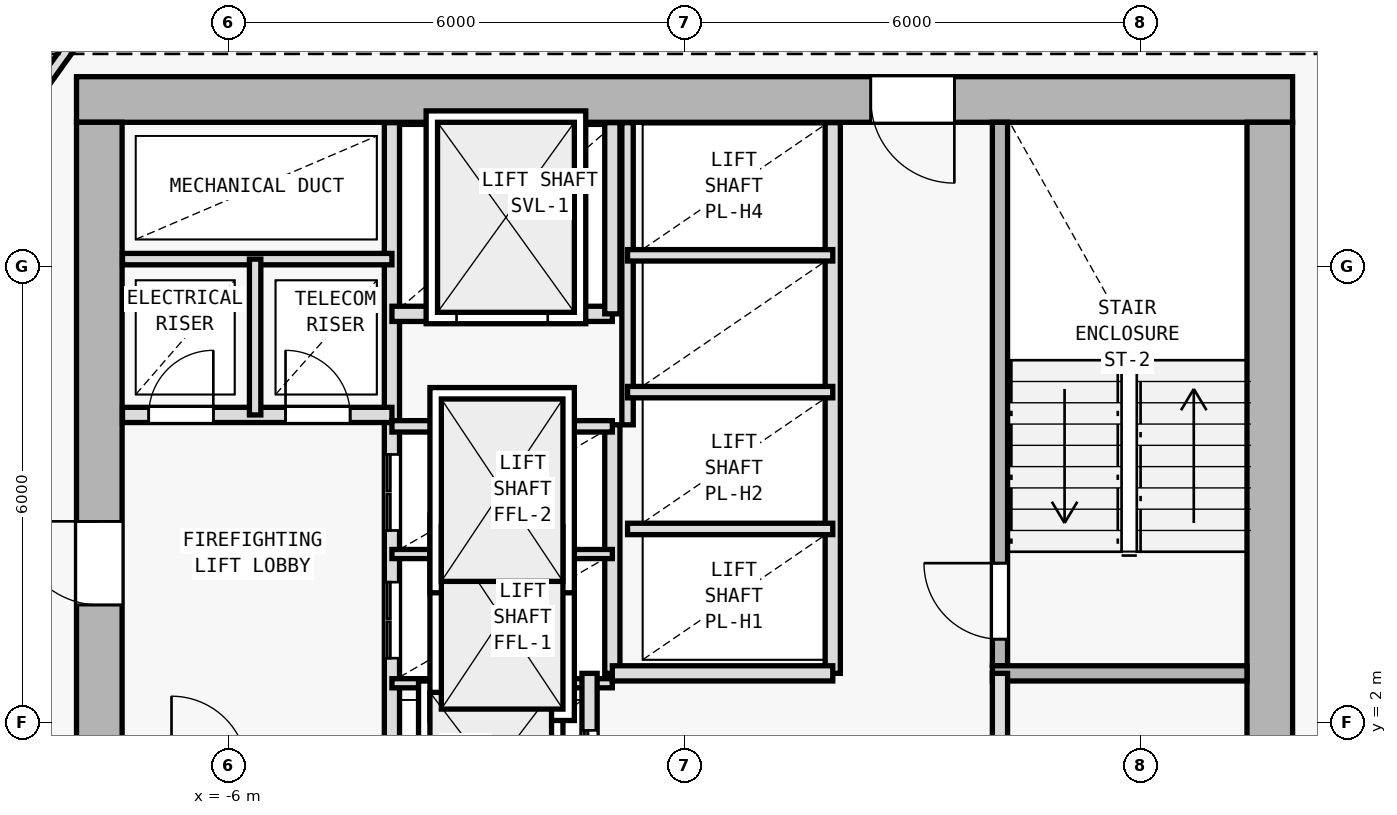
"""IFC4 building model, lengths in metres.
Left out: names, types, materials, properties, quantities, classifications, styles, units other than length and angle.
Written with IfcOpenShell. Run it as: python <this file> out.ifc"""

import sys

from ifc_helpers import new_model, si_unit, direction, frame, frame_2d, origin, origin_2d, place, context, subcontext, project, spatial, rectangle, i_section, extrude, element, fill, save


model = new_model("IFC4")
c1 = context("Model", 3, precision=1e-05, world=origin(), true_north=direction((0.0, 1.0)))
c2 = subcontext(c1, "Body", "Model", "MODEL_VIEW")
j1 = project(units=[si_unit("LENGTHUNIT", "METRE"), si_unit("PLANEANGLEUNIT", "RADIAN")], contexts=[c1])
p1 = place(None, origin())
s1 = spatial("IfcSite", under=j1, at=p1, CompositionType="ELEMENT")
p2 = place(p1, origin())
s2 = spatial("IfcBuilding", under=s1, at=p2, CompositionType="ELEMENT")
p3 = place(p2, frame((0.0, 0.0, 114.9)))
s3 = spatial("IfcBuildingStorey", under=s2, at=p3, CompositionType="ELEMENT", Elevation=114.9)
for number, where, z_axis, x_axis in (
    (1, (7.7, 10.2, 0.0), (0.0, 0.0, 1.0), (1.0, 0.0, 0.0)),
    (2, (-7.7, 10.2, 0.0), (0.0, 0.0, 1.0), (1.0, 0.0, 0.0)),
    (3, (-7.7, 2.0, 0.0), (0.0, 0.0, 1.0), (1.0, 0.0, 0.0)),
):
    element("IfcColumn", number, at=place(p3, frame(where, z_axis=z_axis, x_axis=x_axis)), inside=s3, PredefinedType="COLUMN", context=c2, shape_type="SweptSolid", body=[
        extrude(i_section(OverallWidth=0.409, OverallDepth=0.425, WebThickness=0.021, FlangeThickness=0.034, FilletRadius=0.015, at=origin_2d()), origin(), (0.0, 0.0, 1.0), 3.6),
    ])
p4 = place(p3, frame((8.0, 10.2, 0.0), z_axis=(0.0, 0.0, 1.0), x_axis=(-1.0, 0.0, 0.0)))
e4 = element("IfcWall", 4, at=p4, inside=s3, PredefinedType="SHEAR", context=c2, shape_type="SweptSolid", body=[
    extrude(rectangle(XDim=16.0, YDim=0.6, at=frame_2d((8.0, 0.0))), origin(), (0.0, 0.0, 1.0), 3.35),
])
p5 = place(p4, frame((4.45, 0.0, 0.0)))
e5 = element("IfcOpeningElement", 5, at=p5, cuts=e4, PredefinedType="OPENING", context=c2, shape_type="SweptSolid", body=[
    extrude(rectangle(XDim=1.1, YDim=2.15, at=frame_2d((0.55, 1.075))), frame((0.0, 0.31, 0.0), z_axis=(0.0, -1.0, 0.0), x_axis=(1.0, 0.0, 0.0)), (0.0, 0.0, 1.0), 0.62),
])
p6 = place(p3, frame((-7.7, -9.1, 0.0), z_axis=(0.0, 0.0, 1.0), x_axis=(0.0, 1.0, 0.0)))
e6 = element("IfcWall", 6, at=p6, inside=s3, PredefinedType="SHEAR", context=c2, shape_type="SweptSolid", body=[
    extrude(rectangle(XDim=19.0, YDim=0.6, at=frame_2d((9.5, 0.0))), origin(), (0.0, 0.0, 1.0), 3.35),
])
p7 = place(p6, frame((12.65, 0.0, 0.0)))
e7 = element("IfcOpeningElement", 7, at=p7, cuts=e6, PredefinedType="OPENING", context=c2, shape_type="SweptSolid", body=[
    extrude(rectangle(XDim=1.1, YDim=2.15, at=frame_2d((0.55, 1.075))), frame((0.0, 0.31, 0.0), z_axis=(0.0, -1.0, 0.0), x_axis=(1.0, 0.0, 0.0)), (0.0, 0.0, 1.0), 0.62),
])
p8 = place(p3, frame((7.7, 9.9, 0.0), z_axis=(0.0, 0.0, 1.0), x_axis=(0.0, -1.0, 0.0)))
e8 = element("IfcWall", 8, at=p8, inside=s3, PredefinedType="SHEAR", context=c2, shape_type="SweptSolid", body=[
    extrude(rectangle(XDim=19.0, YDim=0.6, at=frame_2d((9.5, 0.0))), origin(), (0.0, 0.0, 1.0), 3.35),
])
p9 = place(p3, frame((-3.85, 1.35, 0.0), z_axis=(0.0, 0.0, 1.0), x_axis=(0.0, 1.0, 0.0)))
e9 = element("IfcWall", 9, at=p9, inside=s3, PredefinedType="SOLIDWALL", context=c2, shape_type="SweptSolid", body=[
    extrude(rectangle(XDim=8.545, YDim=0.2, at=frame_2d((4.272, 0.0))), origin(), (0.0, 0.0, 1.0), 3.35),
])
p10 = place(p9, frame((1.5, 0.0, 0.0)))
e10 = element("IfcOpeningElement", 10, at=p10, cuts=e9, PredefinedType="OPENING", context=c2, shape_type="SweptSolid", body=[
    extrude(rectangle(XDim=1.0, YDim=2.15, at=frame_2d((0.5, 1.075))), frame((0.0, 0.11, 0.0), z_axis=(0.0, -1.0, 0.0), x_axis=(1.0, 0.0, 0.0)), (0.0, 0.0, 1.0), 0.22),
])
p11 = place(p9, frame((3.18, 0.0, 0.0)))
e11 = element("IfcOpeningElement", 11, at=p11, cuts=e9, PredefinedType="OPENING", context=c2, shape_type="SweptSolid", body=[
    extrude(rectangle(XDim=1.0, YDim=2.15, at=frame_2d((0.5, 1.075))), frame((0.0, 0.11, 0.0), z_axis=(0.0, -1.0, 0.0), x_axis=(1.0, 0.0, 0.0)), (0.0, 0.0, 1.0), 0.22),
])
p12 = place(p3, frame((-7.395, 6.05, 0.0), z_axis=(0.0, 0.0, 1.0), x_axis=(1.0, 0.0, 0.0)))
e12 = element("IfcWall", 12, at=p12, inside=s3, PredefinedType="SOLIDWALL", context=c2, shape_type="SweptSolid", body=[
    extrude(rectangle(XDim=3.545, YDim=0.2, at=frame_2d((1.772, 0.0))), origin(), (0.0, 0.0, 1.0), 3.35),
])
p13 = place(p12, frame((0.345, 0.0, 0.0)))
e13 = element("IfcOpeningElement", 13, at=p13, cuts=e12, PredefinedType="OPENING", context=c2, shape_type="SweptSolid", body=[
    extrude(rectangle(XDim=0.85, YDim=2.1, at=frame_2d((0.425, 1.05))), frame((0.0, 0.11, 0.0), z_axis=(0.0, -1.0, 0.0), x_axis=(1.0, 0.0, 0.0)), (0.0, 0.0, 1.0), 0.22),
])
p14 = place(p12, frame((2.145, 0.0, 0.0)))
e14 = element("IfcOpeningElement", 14, at=p14, cuts=e12, PredefinedType="OPENING", context=c2, shape_type="SweptSolid", body=[
    extrude(rectangle(XDim=0.85, YDim=2.1, at=frame_2d((0.425, 1.05))), frame((0.0, 0.11, 0.0), z_axis=(0.0, -1.0, 0.0), x_axis=(1.0, 0.0, 0.0)), (0.0, 0.0, 1.0), 0.22),
])
p15 = place(p3, frame((-7.395, 8.1, 0.0), z_axis=(0.0, 0.0, 1.0), x_axis=(1.0, 0.0, 0.0)))
e15 = element("IfcWall", 15, at=p15, inside=s3, PredefinedType="PARTITIONING", context=c2, shape_type="SweptSolid", body=[
    extrude(rectangle(XDim=3.545, YDim=0.15, at=frame_2d((1.772, 0.0))), origin(), (0.0, 0.0, 1.0), 3.35),
])
p16 = place(p3, frame((-5.65, 6.05, 0.0), z_axis=(0.0, 0.0, 1.0), x_axis=(0.0, 1.0, 0.0)))
e16 = element("IfcWall", 16, at=p16, inside=s3, PredefinedType="PARTITIONING", context=c2, shape_type="SweptSolid", body=[
    extrude(rectangle(XDim=2.05, YDim=0.15, at=frame_2d((1.025, 0.0))), origin(), (0.0, 0.0, 1.0), 3.35),
])
p17 = place(p3, frame((4.15, 2.75, 0.0), z_axis=(0.0, 0.0, 1.0), x_axis=(0.0, 1.0, 0.0)))
e17 = element("IfcWall", 17, at=p17, inside=s3, PredefinedType="SOLIDWALL", context=c2, shape_type="SweptSolid", body=[
    extrude(rectangle(XDim=7.15, YDim=0.2, at=frame_2d((3.575, 0.0))), origin(), (0.0, 0.0, 1.0), 3.35),
])
p18 = place(p17, frame((0.35, 0.0, 0.0)))
e18 = element("IfcOpeningElement", 18, at=p18, cuts=e17, PredefinedType="OPENING", context=c2, shape_type="SweptSolid", body=[
    extrude(rectangle(XDim=1.0, YDim=2.15, at=frame_2d((0.5, 1.075))), frame((0.0, 0.11, 0.0), z_axis=(0.0, -1.0, 0.0), x_axis=(1.0, 0.0, 0.0)), (0.0, 0.0, 1.0), 0.22),
])
p19 = place(p3, frame((4.05, 2.65, 0.0), z_axis=(0.0, 0.0, 1.0), x_axis=(1.0, 0.0, 0.0)))
e19 = element("IfcWall", 19, at=p19, inside=s3, PredefinedType="SOLIDWALL", context=c2, shape_type="SweptSolid", body=[
    extrude(rectangle(XDim=3.35, YDim=0.2, at=frame_2d((1.675, 0.0))), origin(), (0.0, 0.0, 1.0), 3.35),
])
p20 = place(p3, frame((-0.95, 2.65, 0.0), z_axis=(0.0, 0.0, 1.0), x_axis=(0.0, 1.0, 0.0)))
e20 = element("IfcWall", 20, at=p20, inside=s3, PredefinedType="SOLIDWALL", context=c2, shape_type="SweptSolid", body=[
    extrude(rectangle(XDim=3.27, YDim=0.2, at=frame_2d((1.635, 0.0))), origin(), (0.0, 0.0, 1.0), 3.35),
])
for number, where, z_axis, x_axis in (
    (21, (-3.85, 2.52, 0.0), (0.0, 0.0, 1.0), (1.0, 0.0, 0.0)),
    (22, (-3.85, 4.22, 0.0), (0.0, 0.0, 1.0), (1.0, 0.0, 0.0)),
):
    element("IfcWall", number, at=place(p3, frame(where, z_axis=z_axis, x_axis=x_axis)), inside=s3, PredefinedType="PARTITIONING", context=c2, shape_type="SweptSolid", body=[
        extrude(rectangle(XDim=2.9, YDim=0.12, at=frame_2d((1.45, 0.0))), origin(), (0.0, 0.0, 1.0), 3.35),
    ])
p21 = place(p3, frame((-3.85, 5.9, 0.0), z_axis=(0.0, 0.0, 1.0), x_axis=(1.0, 0.0, 0.0)))
e23 = element("IfcWall", 23, at=p21, inside=s3, PredefinedType="PARTITIONING", context=c2, shape_type="SweptSolid", body=[
    extrude(rectangle(XDim=2.9, YDim=0.15, at=frame_2d((1.45, 0.0))), origin(), (0.0, 0.0, 1.0), 3.35),
])
p22 = place(p3, frame((-3.85, 7.38, 0.0), z_axis=(0.0, 0.0, 1.0), x_axis=(1.0, 0.0, 0.0)))
e24 = element("IfcWall", 24, at=p22, inside=s3, PredefinedType="SOLIDWALL", context=c2, shape_type="SweptSolid", body=[
    extrude(rectangle(XDim=2.9, YDim=0.2, at=frame_2d((1.45, 0.0))), origin(), (0.0, 0.0, 1.0), 3.35),
])
p23 = place(p22, frame((0.85, 0.0, 0.0)))
e25 = element("IfcOpeningElement", 25, at=p23, cuts=e24, PredefinedType="OPENING", context=c2, shape_type="SweptSolid", body=[
    extrude(rectangle(XDim=1.2, YDim=2.2, at=frame_2d((0.6, 1.1))), frame((0.0, 0.11, 0.0), z_axis=(0.0, -1.0, 0.0), x_axis=(1.0, 0.0, 0.0)), (0.0, 0.0, 1.0), 0.22),
])
p24 = place(p3, frame((-0.95, 7.38, 0.0), z_axis=(0.0, 0.0, 1.0), x_axis=(0.0, 1.0, 0.0)))
e26 = element("IfcWall", 26, at=p24, inside=s3, PredefinedType="SOLIDWALL", context=c2, shape_type="SweptSolid", body=[
    extrude(rectangle(XDim=2.515, YDim=0.2, at=frame_2d((1.258, 0.0))), origin(), (0.0, 0.0, 1.0), 3.35),
])
p25 = place(p3, frame((4.15, -6.05, 0.0), z_axis=(0.0, 0.0, 1.0), x_axis=(0.0, 1.0, 0.0)))
e27 = element("IfcWall", 27, at=p25, inside=s3, PredefinedType="SOLIDWALL", context=c2, shape_type="SweptSolid", body=[
    extrude(rectangle(XDim=8.7, YDim=0.2, at=frame_2d((4.35, 0.0))), origin(), (0.0, 0.0, 1.0), 3.35),
])
p26 = place(p25, frame((3.6, 0.0, 0.0)))
e28 = element("IfcOpeningElement", 28, at=p26, cuts=e27, PredefinedType="OPENING", context=c2, shape_type="SweptSolid", body=[
    extrude(rectangle(XDim=0.95, YDim=2.1, at=frame_2d((0.475, 1.05))), frame((0.0, 0.11, 0.0), z_axis=(0.0, -1.0, 0.0), x_axis=(1.0, 0.0, 0.0)), (0.0, 0.0, 1.0), 0.22),
])
p27 = place(p3, frame((-1.25, -6.05, 0.0), z_axis=(0.0, 0.0, 1.0), x_axis=(0.0, 1.0, 0.0)))
e29 = element("IfcWall", 29, at=p27, inside=s3, PredefinedType="SOLIDWALL", context=c2, shape_type="SweptSolid", body=[
    extrude(rectangle(XDim=8.7, YDim=0.2, at=frame_2d((4.35, 0.0))), origin(), (0.0, 0.0, 1.0), 3.35),
])
p28 = place(p27, frame((0.55, 0.0, 0.0)))
e30 = element("IfcOpeningElement", 30, at=p28, cuts=e29, PredefinedType="OPENING", context=c2, shape_type="SweptSolid", body=[
    extrude(rectangle(XDim=1.1, YDim=2.15, at=frame_2d((0.55, 1.075))), frame((0.0, 0.11, 0.0), z_axis=(0.0, -1.0, 0.0), x_axis=(1.0, 0.0, 0.0)), (0.0, 0.0, 1.0), 0.22),
])
p29 = place(p27, frame((2.65, 0.0, 0.0)))
e31 = element("IfcOpeningElement", 31, at=p29, cuts=e29, PredefinedType="OPENING", context=c2, shape_type="SweptSolid", body=[
    extrude(rectangle(XDim=1.1, YDim=2.15, at=frame_2d((0.55, 1.075))), frame((0.0, 0.11, 0.0), z_axis=(0.0, -1.0, 0.0), x_axis=(1.0, 0.0, 0.0)), (0.0, 0.0, 1.0), 0.22),
])
p30 = place(p27, frame((4.75, 0.0, 0.0)))
e32 = element("IfcOpeningElement", 32, at=p30, cuts=e29, PredefinedType="OPENING", context=c2, shape_type="SweptSolid", body=[
    extrude(rectangle(XDim=1.1, YDim=2.15, at=frame_2d((0.55, 1.075))), frame((0.0, 0.11, 0.0), z_axis=(0.0, -1.0, 0.0), x_axis=(1.0, 0.0, 0.0)), (0.0, 0.0, 1.0), 0.22),
])
p31 = place(p27, frame((6.85, 0.0, 0.0)))
e33 = element("IfcOpeningElement", 33, at=p31, cuts=e29, PredefinedType="OPENING", context=c2, shape_type="SweptSolid", body=[
    extrude(rectangle(XDim=1.1, YDim=2.15, at=frame_2d((0.55, 1.075))), frame((0.0, 0.11, 0.0), z_axis=(0.0, -1.0, 0.0), x_axis=(1.0, 0.0, 0.0)), (0.0, 0.0, 1.0), 0.22),
])
p32 = place(p3, frame((1.95, 2.65, 0.0), z_axis=(0.0, 0.0, 1.0), x_axis=(0.0, 1.0, 0.0)))
e34 = element("IfcWall", 34, at=p32, inside=s3, PredefinedType="SOLIDWALL", context=c2, shape_type="SweptSolid", body=[
    extrude(rectangle(XDim=7.245, YDim=0.2, at=frame_2d((3.623, 0.0))), origin(), (0.0, 0.0, 1.0), 3.35),
])
p33 = place(p3, frame((-0.95, 2.65, 0.0), z_axis=(0.0, 0.0, 1.0), x_axis=(1.0, 0.0, 0.0)))
e35 = element("IfcWall", 35, at=p33, inside=s3, PredefinedType="SOLIDWALL", context=c2, shape_type="SweptSolid", body=[
    extrude(rectangle(XDim=2.9, YDim=0.2, at=frame_2d((1.45, 0.0))), origin(), (0.0, 0.0, 1.0), 3.35),
])
p34 = place(p3, frame((-0.75, 5.92, 0.0), z_axis=(0.0, 0.0, 1.0), x_axis=(0.0, 1.0, 0.0)))
e36 = element("IfcWall", 36, at=p34, inside=s3, PredefinedType="PARTITIONING", context=c2, shape_type="SweptSolid", body=[
    extrude(rectangle(XDim=3.975, YDim=0.15, at=frame_2d((1.988, 0.0))), origin(), (0.0, 0.0, 1.0), 3.35),
])
for number, where, z_axis, x_axis in (
    (37, (-0.75, 4.55, 0.0), (0.0, 0.0, 1.0), (1.0, 0.0, 0.0)),
    (38, (-0.75, 6.35, 0.0), (0.0, 0.0, 1.0), (1.0, 0.0, 0.0)),
    (39, (-0.75, 8.15, 0.0), (0.0, 0.0, 1.0), (1.0, 0.0, 0.0)),
):
    element("IfcWall", number, at=place(p3, frame(where, z_axis=z_axis, x_axis=x_axis)), inside=s3, PredefinedType="PARTITIONING", context=c2, shape_type="SweptSolid", body=[
        extrude(rectangle(XDim=2.7, YDim=0.15, at=frame_2d((1.35, 0.0))), origin(), (0.0, 0.0, 1.0), 3.35),
    ])
p35 = place(p3, frame((-9.86, 8.426, 0.0), z_axis=(0.0, 0.0, 1.0), x_axis=(0.582449511476, 0.812866881218, 0.0)))
e40 = element("IfcWall", 40, at=p35, inside=s3, PredefinedType="PARTITIONING", context=c2, shape_type="SweptSolid", body=[
    extrude(rectangle(XDim=4.84, YDim=0.15, at=frame_2d((2.42, 0.0))), origin(), (0.0, 0.0, 1.0), 2.875),
])
p36 = place(p3, frame((7.023, 12.36, 0.0), z_axis=(0.0, 0.0, 1.0), x_axis=(0.84376480085, -0.536713108511, 0.0)))
e41 = element("IfcWall", 41, at=p36, inside=s3, PredefinedType="PARTITIONING", context=c2, shape_type="SweptSolid", body=[
    extrude(rectangle(XDim=7.297, YDim=0.15, at=frame_2d((3.648, 0.0))), origin(), (0.0, 0.0, 1.0), 2.775),
])
p37 = place(p36, frame((2.617, 0.0, 0.0)))
e42 = element("IfcOpeningElement", 42, at=p37, cuts=e41, PredefinedType="OPENING", context=c2, shape_type="SweptSolid", body=[
    extrude(rectangle(XDim=0.9, YDim=2.1, at=frame_2d((0.45, 1.05))), frame((0.0, 0.085, 0.0), z_axis=(0.0, -1.0, 0.0), x_axis=(1.0, 0.0, 0.0)), (0.0, 0.0, 1.0), 0.17),
])
p38 = place(p7, origin())
e43 = element("IfcDoor", 43, at=p38, inside=s3, OperationType="SINGLE_SWING_RIGHT", PredefinedType="DOOR", context=c2, shape_type="SweptSolid", body=[
    extrude(rectangle(XDim=1.1, YDim=2.15, at=frame_2d((0.55, 1.075))), frame((0.0, 0.025, 0.0), z_axis=(0.0, -1.0, 0.0), x_axis=(1.0, 0.0, 0.0)), (0.0, 0.0, 1.0), 0.05),
])
fill(e7, e43)
p39 = place(p5, origin())
e44 = element("IfcDoor", 44, at=p39, inside=s3, OperationType="SINGLE_SWING_LEFT", PredefinedType="DOOR", context=c2, shape_type="SweptSolid", body=[
    extrude(rectangle(XDim=1.1, YDim=2.15, at=frame_2d((0.55, 1.075))), frame((0.0, 0.025, 0.0), z_axis=(0.0, -1.0, 0.0), x_axis=(1.0, 0.0, 0.0)), (0.0, 0.0, 1.0), 0.05),
])
fill(e5, e44)
p40 = place(p13, origin())
e45 = element("IfcDoor", 45, at=p40, inside=s3, OperationType="SINGLE_SWING_RIGHT", PredefinedType="DOOR", context=c2, shape_type="SweptSolid", body=[
    extrude(rectangle(XDim=0.85, YDim=2.1, at=frame_2d((0.425, 1.05))), frame((0.0, 0.025, 0.0), z_axis=(0.0, -1.0, 0.0), x_axis=(1.0, 0.0, 0.0)), (0.0, 0.0, 1.0), 0.05),
])
fill(e13, e45)
p41 = place(p14, origin())
e46 = element("IfcDoor", 46, at=p41, inside=s3, OperationType="SINGLE_SWING_LEFT", PredefinedType="DOOR", context=c2, shape_type="SweptSolid", body=[
    extrude(rectangle(XDim=0.85, YDim=2.1, at=frame_2d((0.425, 1.05))), frame((0.0, 0.025, 0.0), z_axis=(0.0, -1.0, 0.0), x_axis=(1.0, 0.0, 0.0)), (0.0, 0.0, 1.0), 0.05),
])
fill(e14, e46)
p42 = place(p18, origin())
e47 = element("IfcDoor", 47, at=p42, inside=s3, OperationType="SINGLE_SWING_RIGHT", PredefinedType="DOOR", context=c2, shape_type="SweptSolid", body=[
    extrude(rectangle(XDim=1.0, YDim=2.15, at=frame_2d((0.5, 1.075))), frame((0.0, 0.025, 0.0), z_axis=(0.0, -1.0, 0.0), x_axis=(1.0, 0.0, 0.0)), (0.0, 0.0, 1.0), 0.05),
])
fill(e18, e47)
p43 = place(p23, origin())
e48 = element("IfcDoor", 48, at=p43, inside=s3, OperationType="DOUBLE_DOOR_SLIDING", PredefinedType="DOOR", context=c2, shape_type="SweptSolid", body=[
    extrude(rectangle(XDim=1.2, YDim=2.2, at=frame_2d((0.6, 1.1))), frame((0.0, 0.025, 0.0), z_axis=(0.0, -1.0, 0.0), x_axis=(1.0, 0.0, 0.0)), (0.0, 0.0, 1.0), 0.05),
])
fill(e25, e48)
p44 = place(p31, origin())
e49 = element("IfcDoor", 49, at=p44, inside=s3, OperationType="DOUBLE_DOOR_SLIDING", PredefinedType="DOOR", context=c2, shape_type="SweptSolid", body=[
    extrude(rectangle(XDim=1.1, YDim=2.15, at=frame_2d((0.55, 1.075))), frame((0.0, 0.025, 0.0), z_axis=(0.0, -1.0, 0.0), x_axis=(1.0, 0.0, 0.0)), (0.0, 0.0, 1.0), 0.05),
])
fill(e33, e49)
p45 = place(p10, origin())
e50 = element("IfcDoor", 50, at=p45, inside=s3, OperationType="DOUBLE_DOOR_SLIDING", PredefinedType="DOOR", context=c2, shape_type="SweptSolid", body=[
    extrude(rectangle(XDim=1.0, YDim=2.15, at=frame_2d((0.5, 1.075))), frame((0.0, 0.025, 0.0), z_axis=(0.0, -1.0, 0.0), x_axis=(1.0, 0.0, 0.0)), (0.0, 0.0, 1.0), 0.05),
])
fill(e10, e50)
p46 = place(p11, origin())
e51 = element("IfcDoor", 51, at=p46, inside=s3, OperationType="DOUBLE_DOOR_SLIDING", PredefinedType="DOOR", context=c2, shape_type="SweptSolid", body=[
    extrude(rectangle(XDim=1.0, YDim=2.15, at=frame_2d((0.5, 1.075))), frame((0.0, 0.025, 0.0), z_axis=(0.0, -1.0, 0.0), x_axis=(1.0, 0.0, 0.0)), (0.0, 0.0, 1.0), 0.05),
])
fill(e11, e51)
save(model, sys.argv[1])
